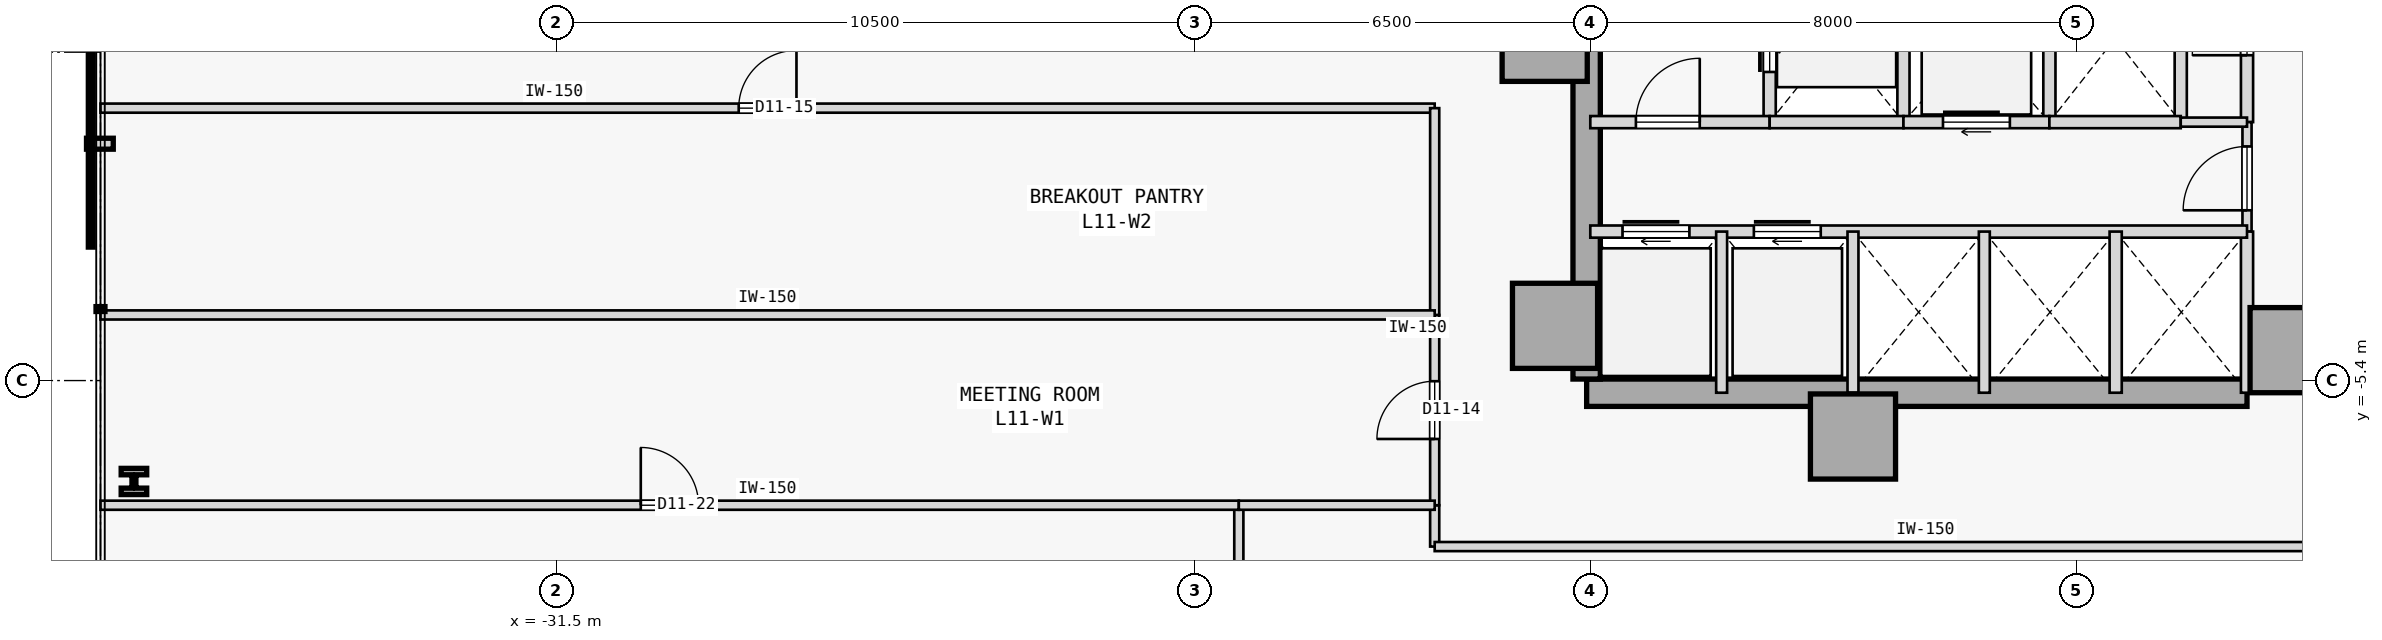
"""IFC4 building model, lengths in metres.
Left out: names, types, materials, properties, quantities, classifications, styles, units other than length and angle.
Written with IfcOpenShell. Run it as: python <this file> out.ifc"""

import sys

from ifc_helpers import new_model, si_unit, direction, frame, frame_2d, origin, origin_2d, place, context, subcontext, project, spatial, rectangle, i_section, extrude, element, fill, save


model = new_model("IFC4")
c1 = context("Model", 3, precision=1e-05, world=origin(), true_north=direction((0.0, 1.0)))
c2 = subcontext(c1, "Body", "Model", "MODEL_VIEW")
j1 = project(units=[si_unit("LENGTHUNIT", "METRE"), si_unit("PLANEANGLEUNIT", "RADIAN")], contexts=[c1])
p1 = place(None, origin())
s1 = spatial("IfcSite", under=j1, at=p1, CompositionType="ELEMENT")
p2 = place(p1, origin())
s2 = spatial("IfcBuilding", under=s1, at=p2, CompositionType="ELEMENT")
p3 = place(p2, frame((0.0, 0.0, 48.4)))
s3 = spatial("IfcBuildingStorey", under=s2, at=p3, CompositionType="ELEMENT", Elevation=48.4)
for number, where, z_axis, x_axis in (
    (1, (-15.25, 0.22, 0.0), (0.0, 0.0, 1.0), (1.0, 0.0, 0.0)),
    (2, (-15.08, -4.5, 0.0), (0.0, 0.0, 1.0), (1.0, 0.0, 0.0)),
    (3, (-10.18, -6.32, 0.0), (0.0, 0.0, 1.0), (1.0, 0.0, 0.0)),
    (4, (-2.95, -4.9, 0.0), (0.0, 0.0, 1.0), (1.0, 0.0, 0.0)),
):
    element("IfcColumn", number, at=place(p3, frame(where, z_axis=z_axis, x_axis=x_axis)), inside=s3, PredefinedType="COLUMN", context=c2, shape_type="SweptSolid", body=[
        extrude(rectangle(XDim=1.4, YDim=1.4, at=origin_2d()), origin(), (0.0, 0.0, 1.0), 3.8),
    ])
p4 = place(p3, frame((-14.56, -5.6, 0.0), z_axis=(0.0, 0.0, 1.0), x_axis=(1.0, 0.0, 0.0)))
e5 = element("IfcWall", 5, at=p4, inside=s3, PredefinedType="SHEAR", context=c2, shape_type="SweptSolid", body=[
    extrude(rectangle(XDim=10.86, YDim=0.45, at=frame_2d((5.43, 0.0))), origin(), (0.0, 0.0, 1.0), 3.575),
])
p5 = place(p3, frame((-14.56, -5.375, 0.0), z_axis=(0.0, 0.0, 1.0), x_axis=(0.0, 1.0, 0.0)))
e6 = element("IfcWall", 6, at=p5, inside=s3, PredefinedType="SHEAR", context=c2, shape_type="SweptSolid", body=[
    extrude(rectangle(XDim=10.75, YDim=0.45, at=frame_2d((5.375, 0.0))), origin(), (0.0, 0.0, 1.0), 3.575),
])
p6 = place(p3, frame((-38.45, -7.059, 0.0), z_axis=(0.0, 0.0, 1.0), x_axis=(1.0, 0.0, 0.0)))
e7 = element("IfcColumn", 7, at=p6, inside=s3, PredefinedType="COLUMN", context=c2, shape_type="SweptSolid", body=[
    extrude(i_section(OverallWidth=0.42, OverallDepth=0.431, WebThickness=0.065, FlangeThickness=0.106, FilletRadius=0.015, at=origin_2d()), origin(), (0.0, 0.0, 1.0), 3.8),
])
p7 = place(p3, frame((-3.7, -1.15, 0.0), z_axis=(0.0, 0.0, 1.0), x_axis=(0.0, 1.0, 0.0)))
e8 = element("IfcWall", 8, at=p7, inside=s3, PredefinedType="STANDARD", context=c2, shape_type="SweptSolid", body=[
    extrude(rectangle(XDim=6.75, YDim=0.2, at=frame_2d((3.375, 0.0))), origin(), (0.0, 0.0, 1.0), 3.575),
])
p8 = place(p7, frame((1.1, 0.0, 0.0)))
e9 = element("IfcOpeningElement", 9, at=p8, cuts=e8, PredefinedType="OPENING", context=c2, shape_type="SweptSolid", body=[
    extrude(rectangle(XDim=0.9, YDim=2.15, at=frame_2d((0.45, 1.075))), frame((0.0, 0.11, 0.0), z_axis=(0.0, -1.0, 0.0), x_axis=(1.0, 0.0, 0.0)), (0.0, 0.0, 1.0), 0.22),
])
p9 = place(p7, frame((4.0, 0.0, 0.0)))
e10 = element("IfcOpeningElement", 10, at=p9, cuts=e8, PredefinedType="OPENING", context=c2, shape_type="SweptSolid", body=[
    extrude(rectangle(XDim=0.92, YDim=2.15, at=frame_2d((0.46, 1.075))), frame((0.0, 0.11, 0.0), z_axis=(0.0, -1.0, 0.0), x_axis=(1.0, 0.0, 0.0)), (0.0, 0.0, 1.0), 0.22),
])
p10 = place(p3, frame((-3.7, -2.95, 0.0), z_axis=(0.0, 0.0, 1.0), x_axis=(0.0, 1.0, 0.0)))
e11 = element("IfcWall", 11, at=p10, inside=s3, PredefinedType="PARTITIONING", context=c2, shape_type="SweptSolid", body=[
    extrude(rectangle(XDim=1.8, YDim=0.15, at=frame_2d((0.9, 0.0))), origin(), (0.0, 0.0, 1.0), 3.575),
])
p11 = place(p10, frame((0.35, 0.0, 0.0)))
e12 = element("IfcOpeningElement", 12, at=p11, cuts=e11, PredefinedType="OPENING", context=c2, shape_type="SweptSolid", body=[
    extrude(rectangle(XDim=1.05, YDim=2.18, at=frame_2d((0.525, 1.09))), frame((0.0, 0.085, 0.0), z_axis=(0.0, -1.0, 0.0), x_axis=(1.0, 0.0, 0.0)), (0.0, 0.0, 1.0), 0.17),
])
p12 = place(p3, frame((-3.7, -5.6, 0.0), z_axis=(0.0, 0.0, 1.0), x_axis=(0.0, 1.0, 0.0)))
e13 = element("IfcWall", 13, at=p12, inside=s3, PredefinedType="STANDARD", context=c2, shape_type="SweptSolid", body=[
    extrude(rectangle(XDim=2.65, YDim=0.2, at=frame_2d((1.325, 0.0))), origin(), (0.0, 0.0, 1.0), 3.575),
])
p13 = place(p3, frame((-11.55, -1.15, 0.0), z_axis=(0.0, 0.0, 1.0), x_axis=(0.0, 1.0, 0.0)))
e14 = element("IfcWall", 14, at=p13, inside=s3, PredefinedType="STANDARD", context=c2, shape_type="SweptSolid", body=[
    extrude(rectangle(XDim=2.75, YDim=0.2, at=frame_2d((1.375, 0.0))), origin(), (0.0, 0.0, 1.0), 3.575),
])
p14 = place(p13, frame((0.825, 0.0, 0.0)))
e15 = element("IfcOpeningElement", 15, at=p14, cuts=e14, PredefinedType="OPENING", context=c2, shape_type="SweptSolid", body=[
    extrude(rectangle(XDim=1.1, YDim=2.15, at=frame_2d((0.55, 1.075))), frame((0.0, 0.11, 0.0), z_axis=(0.0, -1.0, 0.0), x_axis=(1.0, 0.0, 0.0)), (0.0, 0.0, 1.0), 0.22),
])
p15 = place(p3, frame((-9.35, -1.15, 0.0), z_axis=(0.0, 0.0, 1.0), x_axis=(0.0, 1.0, 0.0)))
e16 = element("IfcWall", 16, at=p15, inside=s3, PredefinedType="STANDARD", context=c2, shape_type="SweptSolid", body=[
    extrude(rectangle(XDim=2.75, YDim=0.2, at=frame_2d((1.375, 0.0))), origin(), (0.0, 0.0, 1.0), 3.575),
])
p16 = place(p3, frame((-14.5, -1.15, 0.0), z_axis=(0.0, 0.0, 1.0), x_axis=(1.0, 0.0, 0.0)))
e17 = element("IfcWall", 17, at=p16, inside=s3, PredefinedType="STANDARD", context=c2, shape_type="SweptSolid", body=[
    extrude(rectangle(XDim=2.95, YDim=0.2, at=frame_2d((1.475, 0.0))), origin(), (0.0, 0.0, 1.0), 3.575),
])
p17 = place(p16, frame((0.75, 0.0, 0.0)))
e18 = element("IfcOpeningElement", 18, at=p17, cuts=e17, PredefinedType="OPENING", context=c2, shape_type="SweptSolid", body=[
    extrude(rectangle(XDim=1.05, YDim=2.18, at=frame_2d((0.525, 1.09))), frame((0.0, 0.11, 0.0), z_axis=(0.0, -1.0, 0.0), x_axis=(1.0, 0.0, 0.0)), (0.0, 0.0, 1.0), 0.22),
])
p18 = place(p3, frame((-11.55, -1.15, 0.0), z_axis=(0.0, 0.0, 1.0), x_axis=(1.0, 0.0, 0.0)))
e19 = element("IfcWall", 19, at=p18, inside=s3, PredefinedType="STANDARD", context=c2, shape_type="SweptSolid", body=[
    extrude(rectangle(XDim=2.2, YDim=0.2, at=frame_2d((1.1, 0.0))), origin(), (0.0, 0.0, 1.0), 3.575),
])
p19 = place(p3, frame((-6.95, -1.15, 0.0), z_axis=(0.0, 0.0, 1.0), x_axis=(0.0, 1.0, 0.0)))
e20 = element("IfcWall", 20, at=p19, inside=s3, PredefinedType="STANDARD", context=c2, shape_type="SweptSolid", body=[
    extrude(rectangle(XDim=2.75, YDim=0.2, at=frame_2d((1.375, 0.0))), origin(), (0.0, 0.0, 1.0), 3.575),
])
p20 = place(p3, frame((-9.35, -1.15, 0.0), z_axis=(0.0, 0.0, 1.0), x_axis=(1.0, 0.0, 0.0)))
e21 = element("IfcWall", 21, at=p20, inside=s3, PredefinedType="STANDARD", context=c2, shape_type="SweptSolid", body=[
    extrude(rectangle(XDim=2.4, YDim=0.2, at=frame_2d((1.2, 0.0))), origin(), (0.0, 0.0, 1.0), 3.575),
])
p21 = place(p20, frame((0.65, 0.0, 0.0)))
e22 = element("IfcOpeningElement", 22, at=p21, cuts=e21, PredefinedType="OPENING", context=c2, shape_type="SweptSolid", body=[
    extrude(rectangle(XDim=1.1, YDim=2.15, at=frame_2d((0.55, 1.075))), frame((0.0, 0.11, 0.0), z_axis=(0.0, -1.0, 0.0), x_axis=(1.0, 0.0, 0.0)), (0.0, 0.0, 1.0), 0.22),
])
p22 = place(p3, frame((-4.79, -1.15, 0.0), z_axis=(0.0, 0.0, 1.0), x_axis=(0.0, 1.0, 0.0)))
e23 = element("IfcWall", 23, at=p22, inside=s3, PredefinedType="STANDARD", context=c2, shape_type="SweptSolid", body=[
    extrude(rectangle(XDim=2.75, YDim=0.2, at=frame_2d((1.375, 0.0))), origin(), (0.0, 0.0, 1.0), 3.575),
])
p23 = place(p3, frame((-6.95, -1.15, 0.0), z_axis=(0.0, 0.0, 1.0), x_axis=(1.0, 0.0, 0.0)))
e24 = element("IfcWall", 24, at=p23, inside=s3, PredefinedType="STANDARD", context=c2, shape_type="SweptSolid", body=[
    extrude(rectangle(XDim=2.16, YDim=0.2, at=frame_2d((1.08, 0.0))), origin(), (0.0, 0.0, 1.0), 3.575),
])
p24 = place(p3, frame((-4.79, -1.15, 0.0), z_axis=(0.0, 0.0, 1.0), x_axis=(1.0, 0.0, 0.0)))
e25 = element("IfcWall", 25, at=p24, inside=s3, PredefinedType="PARTITIONING", context=c2, shape_type="SweptSolid", body=[
    extrude(rectangle(XDim=1.09, YDim=0.15, at=frame_2d((0.545, 0.0))), origin(), (0.0, 0.0, 1.0), 3.575),
])
p25 = place(p3, frame((-14.5, -2.95, 0.0), z_axis=(0.0, 0.0, 1.0), x_axis=(1.0, 0.0, 0.0)))
e26 = element("IfcWall", 26, at=p25, inside=s3, PredefinedType="STANDARD", context=c2, shape_type="SweptSolid", body=[
    extrude(rectangle(XDim=10.8, YDim=0.2, at=frame_2d((5.4, 0.0))), origin(), (0.0, 0.0, 1.0), 3.575),
])
p26 = place(p25, frame((0.53, 0.0, 0.0)))
e27 = element("IfcOpeningElement", 27, at=p26, cuts=e26, PredefinedType="OPENING", context=c2, shape_type="SweptSolid", body=[
    extrude(rectangle(XDim=1.1, YDim=2.15, at=frame_2d((0.55, 1.075))), frame((0.0, 0.11, 0.0), z_axis=(0.0, -1.0, 0.0), x_axis=(1.0, 0.0, 0.0)), (0.0, 0.0, 1.0), 0.22),
])
p27 = place(p25, frame((2.69, 0.0, 0.0)))
e28 = element("IfcOpeningElement", 28, at=p27, cuts=e26, PredefinedType="OPENING", context=c2, shape_type="SweptSolid", body=[
    extrude(rectangle(XDim=1.1, YDim=2.15, at=frame_2d((0.55, 1.075))), frame((0.0, 0.11, 0.0), z_axis=(0.0, -1.0, 0.0), x_axis=(1.0, 0.0, 0.0)), (0.0, 0.0, 1.0), 0.22),
])
p28 = place(p3, frame((-5.86, -5.6, 0.0), z_axis=(0.0, 0.0, 1.0), x_axis=(0.0, 1.0, 0.0)))
e29 = element("IfcWall", 29, at=p28, inside=s3, PredefinedType="STANDARD", context=c2, shape_type="SweptSolid", body=[
    extrude(rectangle(XDim=2.65, YDim=0.2, at=frame_2d((1.325, 0.0))), origin(), (0.0, 0.0, 1.0), 3.575),
])
for number, where, z_axis, x_axis in (
    (30, (-12.34, -5.6, 0.0), (0.0, 0.0, 1.0), (0.0, 1.0, 0.0)),
    (31, (-10.18, -5.6, 0.0), (0.0, 0.0, 1.0), (0.0, 1.0, 0.0)),
    (32, (-8.02, -5.6, 0.0), (0.0, 0.0, 1.0), (0.0, 1.0, 0.0)),
):
    element("IfcWall", number, at=place(p3, frame(where, z_axis=z_axis, x_axis=x_axis)), inside=s3, PredefinedType="STANDARD", context=c2, shape_type="SweptSolid", body=[
        extrude(rectangle(XDim=2.65, YDim=0.18, at=frame_2d((1.325, 0.0))), origin(), (0.0, 0.0, 1.0), 3.575),
    ])
p29 = place(p3, frame((-17.059, -8.13, 0.0), z_axis=(0.0, 0.0, 1.0), x_axis=(0.0, 1.0, 0.0)))
e33 = element("IfcWall", 33, at=p29, inside=s3, PredefinedType="PARTITIONING", context=c2, shape_type="SweptSolid", body=[
    extrude(rectangle(XDim=0.68, YDim=0.15, at=frame_2d((0.34, 0.0))), origin(), (0.0, 0.0, 1.0), 3.575),
])
p30 = place(p3, frame((-17.059, -8.13, 0.0), z_axis=(0.0, 0.0, 1.0), x_axis=(1.0, 0.0, 0.0)))
e34 = element("IfcWall", 34, at=p30, inside=s3, PredefinedType="PARTITIONING", context=c2, shape_type="SweptSolid", body=[
    extrude(rectangle(XDim=16.139, YDim=0.15, at=frame_2d((8.07, 0.0))), origin(), (0.0, 0.0, 1.0), 3.575),
])
p31 = place(p3, frame((-17.059, -7.45, 0.0), z_axis=(0.0, 0.0, 1.0), x_axis=(0.0, 1.0, 0.0)))
e35 = element("IfcWall", 35, at=p31, inside=s3, PredefinedType="PARTITIONING", context=c2, shape_type="SweptSolid", body=[
    extrude(rectangle(XDim=3.129, YDim=0.15, at=frame_2d((1.564, 0.0))), origin(), (0.0, 0.0, 1.0), 3.575),
])
p32 = place(p31, frame((1.09, 0.0, 0.0)))
e36 = element("IfcOpeningElement", 36, at=p32, cuts=e35, PredefinedType="OPENING", context=c2, shape_type="SweptSolid", body=[
    extrude(rectangle(XDim=0.95, YDim=2.15, at=frame_2d((0.475, 1.075))), frame((0.0, 0.085, 0.0), z_axis=(0.0, -1.0, 0.0), x_axis=(1.0, 0.0, 0.0)), (0.0, 0.0, 1.0), 0.17),
])
p33 = place(p3, frame((-39.0, -0.92, 0.0), z_axis=(0.0, 0.0, 1.0), x_axis=(1.0, 0.0, 0.0)))
e37 = element("IfcWall", 37, at=p33, inside=s3, PredefinedType="PARTITIONING", context=c2, shape_type="SweptSolid", body=[
    extrude(rectangle(XDim=21.941, YDim=0.15, at=frame_2d((10.97, 0.0))), origin(), (0.0, 0.0, 1.0), 3.575),
])
p34 = place(p33, frame((10.496, 0.0, 0.0)))
e38 = element("IfcOpeningElement", 38, at=p34, cuts=e37, PredefinedType="OPENING", context=c2, shape_type="SweptSolid", body=[
    extrude(rectangle(XDim=0.95, YDim=2.15, at=frame_2d((0.475, 1.075))), frame((0.0, 0.085, 0.0), z_axis=(0.0, -1.0, 0.0), x_axis=(1.0, 0.0, 0.0)), (0.0, 0.0, 1.0), 0.17),
])
p35 = place(p3, frame((-17.059, -4.321, 0.0), z_axis=(0.0, 0.0, 1.0), x_axis=(0.0, 1.0, 0.0)))
e39 = element("IfcWall", 39, at=p35, inside=s3, PredefinedType="PARTITIONING", context=c2, shape_type="SweptSolid", body=[
    extrude(rectangle(XDim=3.401, YDim=0.15, at=frame_2d((1.701, 0.0))), origin(), (0.0, 0.0, 1.0), 3.575),
])
p36 = place(p3, frame((-20.28, -25.0, 0.0), z_axis=(0.0, 0.0, 1.0), x_axis=(0.0, 1.0, 0.0)))
e40 = element("IfcWall", 40, at=p36, inside=s3, PredefinedType="PARTITIONING", context=c2, shape_type="SweptSolid", body=[
    extrude(rectangle(XDim=17.55, YDim=0.15, at=frame_2d((8.775, 0.0))), origin(), (0.0, 0.0, 1.0), 3.575),
])
p37 = place(p3, frame((-39.0, -7.45, 0.0), z_axis=(0.0, 0.0, 1.0), x_axis=(1.0, 0.0, 0.0)))
e41 = element("IfcWall", 41, at=p37, inside=s3, PredefinedType="PARTITIONING", context=c2, shape_type="SweptSolid", body=[
    extrude(rectangle(XDim=18.72, YDim=0.15, at=frame_2d((9.36, 0.0))), origin(), (0.0, 0.0, 1.0), 3.575),
])
p38 = place(p37, frame((8.885, 0.0, 0.0)))
e42 = element("IfcOpeningElement", 42, at=p38, cuts=e41, PredefinedType="OPENING", context=c2, shape_type="SweptSolid", body=[
    extrude(rectangle(XDim=0.95, YDim=2.15, at=frame_2d((0.475, 1.075))), frame((0.0, 0.085, 0.0), z_axis=(0.0, -1.0, 0.0), x_axis=(1.0, 0.0, 0.0)), (0.0, 0.0, 1.0), 0.17),
])
p39 = place(p3, frame((-20.28, -7.45, 0.0), z_axis=(0.0, 0.0, 1.0), x_axis=(1.0, 0.0, 0.0)))
e43 = element("IfcWall", 43, at=p39, inside=s3, PredefinedType="PARTITIONING", context=c2, shape_type="SweptSolid", body=[
    extrude(rectangle(XDim=3.221, YDim=0.15, at=frame_2d((1.61, 0.0))), origin(), (0.0, 0.0, 1.0), 3.575),
])
p40 = place(p3, frame((-39.0, -4.321, 0.0), z_axis=(0.0, 0.0, 1.0), x_axis=(1.0, 0.0, 0.0)))
e44 = element("IfcWall", 44, at=p40, inside=s3, PredefinedType="PARTITIONING", context=c2, shape_type="SweptSolid", body=[
    extrude(rectangle(XDim=21.941, YDim=0.15, at=frame_2d((10.97, 0.0))), origin(), (0.0, 0.0, 1.0), 3.575),
])
p41 = place(p17, origin())
e45 = element("IfcDoor", 45, at=p41, inside=s3, OperationType="SINGLE_SWING_RIGHT", PredefinedType="DOOR", context=c2, shape_type="SweptSolid", body=[
    extrude(rectangle(XDim=1.05, YDim=2.18, at=frame_2d((0.525, 1.09))), frame((0.0, 0.025, 0.0), z_axis=(0.0, -1.0, 0.0), x_axis=(1.0, 0.0, 0.0)), (0.0, 0.0, 1.0), 0.05),
])
fill(e18, e45)
p42 = place(p11, origin())
e46 = element("IfcDoor", 46, at=p42, inside=s3, OperationType="SINGLE_SWING_LEFT", PredefinedType="DOOR", context=c2, shape_type="SweptSolid", body=[
    extrude(rectangle(XDim=1.05, YDim=2.18, at=frame_2d((0.525, 1.09))), frame((0.0, 0.025, 0.0), z_axis=(0.0, -1.0, 0.0), x_axis=(1.0, 0.0, 0.0)), (0.0, 0.0, 1.0), 0.05),
])
fill(e12, e46)
p43 = place(p14, origin())
e47 = element("IfcDoor", 47, at=p43, inside=s3, OperationType="SLIDING_TO_RIGHT", PredefinedType="DOOR", context=c2, shape_type="SweptSolid", body=[
    extrude(rectangle(XDim=1.1, YDim=2.15, at=frame_2d((0.55, 1.075))), frame((0.0, 0.025, 0.0), z_axis=(0.0, -1.0, 0.0), x_axis=(1.0, 0.0, 0.0)), (0.0, 0.0, 1.0), 0.05),
])
fill(e15, e47)
p44 = place(p21, origin())
e48 = element("IfcDoor", 48, at=p44, inside=s3, OperationType="SLIDING_TO_RIGHT", PredefinedType="DOOR", context=c2, shape_type="SweptSolid", body=[
    extrude(rectangle(XDim=1.1, YDim=2.15, at=frame_2d((0.55, 1.075))), frame((0.0, 0.025, 0.0), z_axis=(0.0, -1.0, 0.0), x_axis=(1.0, 0.0, 0.0)), (0.0, 0.0, 1.0), 0.05),
])
fill(e22, e48)
p45 = place(p26, origin())
e49 = element("IfcDoor", 49, at=p45, inside=s3, OperationType="SLIDING_TO_RIGHT", PredefinedType="DOOR", context=c2, shape_type="SweptSolid", body=[
    extrude(rectangle(XDim=1.1, YDim=2.15, at=frame_2d((0.55, 1.075))), frame((0.0, 0.025, 0.0), z_axis=(0.0, -1.0, 0.0), x_axis=(1.0, 0.0, 0.0)), (0.0, 0.0, 1.0), 0.05),
])
fill(e27, e49)
p46 = place(p27, origin())
e50 = element("IfcDoor", 50, at=p46, inside=s3, OperationType="SLIDING_TO_RIGHT", PredefinedType="DOOR", context=c2, shape_type="SweptSolid", body=[
    extrude(rectangle(XDim=1.1, YDim=2.15, at=frame_2d((0.55, 1.075))), frame((0.0, 0.025, 0.0), z_axis=(0.0, -1.0, 0.0), x_axis=(1.0, 0.0, 0.0)), (0.0, 0.0, 1.0), 0.05),
])
fill(e28, e50)
p47 = place(p8, origin())
e51 = element("IfcDoor", 51, at=p47, inside=s3, OperationType="SINGLE_SWING_LEFT", PredefinedType="DOOR", context=c2, shape_type="SweptSolid", body=[
    extrude(rectangle(XDim=0.9, YDim=2.15, at=frame_2d((0.45, 1.075))), frame((0.0, 0.025, 0.0), z_axis=(0.0, -1.0, 0.0), x_axis=(1.0, 0.0, 0.0)), (0.0, 0.0, 1.0), 0.05),
])
fill(e9, e51)
p48 = place(p32, origin())
e52 = element("IfcDoor", 52, at=p48, inside=s3, OperationType="SINGLE_SWING_LEFT", PredefinedType="DOOR", context=c2, shape_type="SweptSolid", body=[
    extrude(rectangle(XDim=0.95, YDim=2.15, at=frame_2d((0.475, 1.075))), frame((0.0, 0.025, 0.0), z_axis=(0.0, -1.0, 0.0), x_axis=(1.0, 0.0, 0.0)), (0.0, 0.0, 1.0), 0.05),
])
fill(e36, e52)
p49 = place(p34, origin())
e53 = element("IfcDoor", 53, at=p49, inside=s3, OperationType="SINGLE_SWING_RIGHT", PredefinedType="DOOR", context=c2, shape_type="SweptSolid", body=[
    extrude(rectangle(XDim=0.95, YDim=2.15, at=frame_2d((0.475, 1.075))), frame((0.0, 0.025, 0.0), z_axis=(0.0, -1.0, 0.0), x_axis=(1.0, 0.0, 0.0)), (0.0, 0.0, 1.0), 0.05),
])
fill(e38, e53)
p50 = place(p38, origin())
e54 = element("IfcDoor", 54, at=p50, inside=s3, OperationType="SINGLE_SWING_LEFT", PredefinedType="DOOR", context=c2, shape_type="SweptSolid", body=[
    extrude(rectangle(XDim=0.95, YDim=2.15, at=frame_2d((0.475, 1.075))), frame((0.0, 0.025, 0.0), z_axis=(0.0, -1.0, 0.0), x_axis=(1.0, 0.0, 0.0)), (0.0, 0.0, 1.0), 0.05),
])
fill(e42, e54)
save(model, sys.argv[1])
